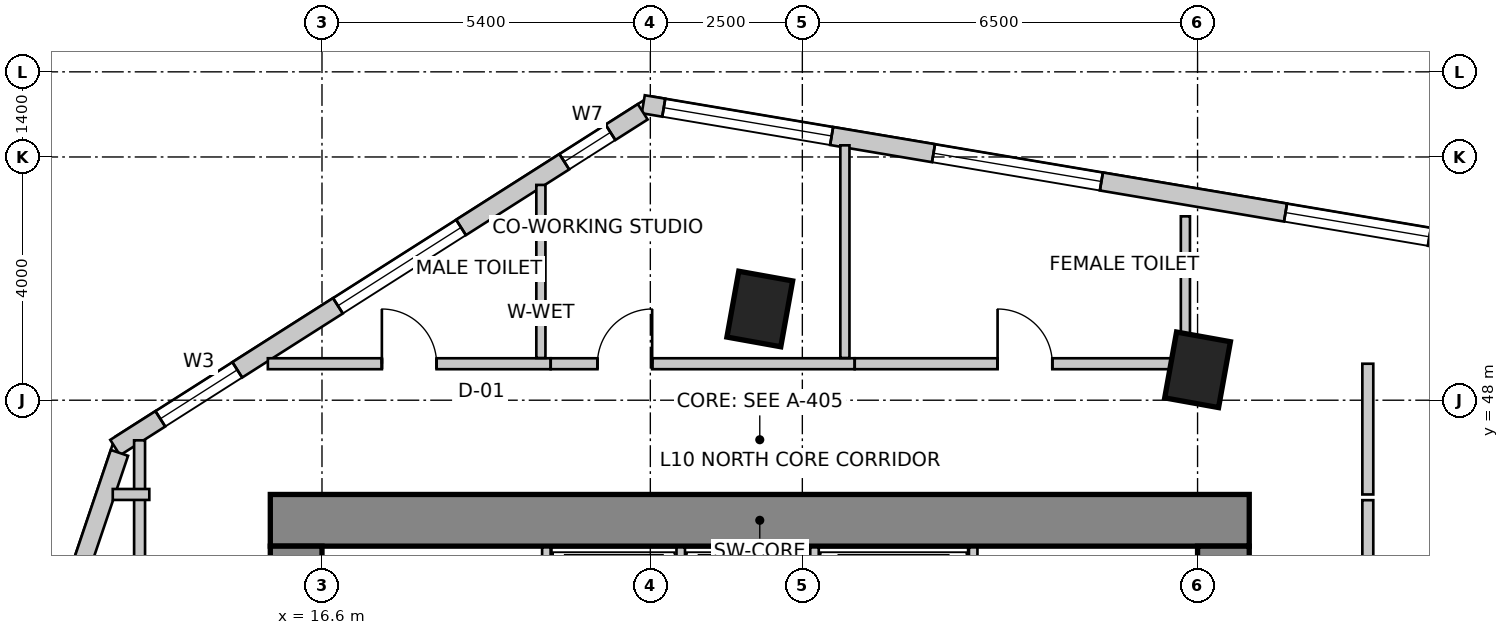
"""IFC4 building model, lengths in metres.
Left out: names, types, materials, properties, quantities, classifications, styles, units other than length and angle.
Written with IfcOpenShell. Run it as: python <this file> out.ifc"""

import sys

from ifc_helpers import new_model, si_unit, direction, frame, frame_2d, origin, origin_2d, place, context, subcontext, project, spatial, rectangle, extrude, source, transform, mapped, element, fill, save


model = new_model("IFC4")
c1 = context("Model", 3, precision=1e-05, world=origin(), true_north=direction((0.0, 1.0)))
c2 = subcontext(c1, "Body", "Model", "MODEL_VIEW")
j1 = project(units=[si_unit("LENGTHUNIT", "METRE"), si_unit("PLANEANGLEUNIT", "RADIAN")], contexts=[c1])
p1 = place(None, origin())
s1 = spatial("IfcSite", under=j1, at=p1, CompositionType="ELEMENT")
p2 = place(p1, origin())
s2 = spatial("IfcBuilding", under=s1, at=p2, CompositionType="ELEMENT")
p3 = place(p2, frame((0.0, 0.0, 43.0)))
s3 = spatial("IfcBuildingStorey", under=s2, at=p3, CompositionType="ELEMENT", Elevation=43.0)
p4 = place(p3, frame((15.75, 46.025, 0.0), z_axis=(0.0, 0.0, 1.0), x_axis=(1.0, 0.0, 0.0)))
e1 = element("IfcWall", 1, at=p4, inside=s3, PredefinedType="SHEAR", context=c2, shape_type="SweptSolid", body=[
    extrude(rectangle(XDim=16.1, YDim=0.85, at=frame_2d((8.05, 0.0))), origin(), (0.0, 0.0, 1.0), 4.0),
])
p5 = place(p3, frame((16.175, 34.2, 0.0), z_axis=(0.0, 0.0, 1.0), x_axis=(0.0, 1.0, 0.0)))
e2 = element("IfcWall", 2, at=p5, inside=s3, PredefinedType="SHEAR", context=c2, shape_type="SweptSolid", body=[
    extrude(rectangle(XDim=11.4, YDim=0.85, at=frame_2d((5.7, 0.0))), origin(), (0.0, 0.0, 1.0), 4.0),
])
m1 = source(origin(), c2, "Body", "SweptSolid", [
    extrude(rectangle(XDim=1.1, YDim=2.15, at=frame_2d((0.55, 1.075))), frame((0.0, 0.435, 0.0), z_axis=(0.0, -1.0, 0.0), x_axis=(1.0, 0.0, 0.0)), (0.0, 0.0, 1.0), 0.87),
])
p6 = place(p5, frame((7.15, 0.0, 0.0)))
e3 = element("IfcOpeningElement", 3, at=p6, cuts=e2, PredefinedType="OPENING", context=c2, shape_type="MappedRepresentation", body=[
    mapped(m1, transform((0.0, 0.0, 0.0), scale=1.0)),
])
p7 = place(p3, frame((31.425, 34.2, 0.0), z_axis=(0.0, 0.0, 1.0), x_axis=(0.0, 1.0, 0.0)))
e4 = element("IfcWall", 4, at=p7, inside=s3, PredefinedType="SHEAR", context=c2, shape_type="SweptSolid", body=[
    extrude(rectangle(XDim=11.4, YDim=0.85, at=frame_2d((5.7, 0.0))), origin(), (0.0, 0.0, 1.0), 4.0),
])
p8 = place(p7, frame((7.35, 0.0, 0.0)))
e5 = element("IfcOpeningElement", 5, at=p8, cuts=e4, PredefinedType="OPENING", context=c2, shape_type="MappedRepresentation", body=[
    mapped(m1, transform((0.0, 0.0, 0.0), scale=1.0)),
])
m2 = source(origin(), c2, "Body", "SweptSolid", [
    extrude(rectangle(XDim=0.9, YDim=1.1, at=origin_2d()), origin(), (0.0, 0.0, 1.0), 4.0),
])
for number, where, z_axis, x_axis in (
    (6, (23.8, 49.5, 0.0), (0.0, 0.0, 1.0), (0.984, -0.177, 0.0)),
    (7, (31.0, 48.5, 0.0), (0.0, 0.0, 1.0), (0.984, -0.177, 0.0)),
):
    element("IfcColumn", number, at=place(p3, frame(where, z_axis=z_axis, x_axis=x_axis)), inside=s3, PredefinedType="COLUMN", context=c2, shape_type="MappedRepresentation", body=[
        mapped(m2, transform((0.0, 0.0, 0.0), scale=1.0)),
    ])
p9 = place(p3, frame((58.761, 46.648, 0.0), z_axis=(0.0, 0.0, 1.0), x_axis=(-0.98607502735, 0.166301053624, 0.0)))
e8 = element("IfcWall", 8, at=p9, inside=s3, PredefinedType="SOLIDWALL", context=c2, shape_type="SweptSolid", body=[
    extrude(rectangle(XDim=37.397, YDim=0.3, at=frame_2d((18.699, 0.0))), origin(), (0.0, 0.0, 1.0), 3.75),
])
m3 = source(origin(), c2, "Body", "SweptSolid", [
    extrude(rectangle(XDim=2.4, YDim=2.2, at=frame_2d((1.2, 1.1))), frame((0.0, 0.16, 0.0), z_axis=(0.0, -1.0, 0.0), x_axis=(1.0, 0.0, 0.0)), (0.0, 0.0, 1.0), 0.32),
])
p10 = place(p9, frame((0.476, 0.0, 0.85)))
e9 = element("IfcOpeningElement", 9, at=p10, cuts=e8, PredefinedType="OPENING", context=c2, shape_type="MappedRepresentation", body=[
    mapped(m3, transform((0.0, 0.0, 0.0), scale=1.0)),
])
m4 = source(origin(), c2, "Body", "SweptSolid", [
    extrude(rectangle(XDim=2.8, YDim=2.4, at=frame_2d((1.4, 1.2))), frame((0.0, 0.16, 0.0), z_axis=(0.0, -1.0, 0.0), x_axis=(1.0, 0.0, 0.0)), (0.0, 0.0, 1.0), 0.32),
])
p11 = place(p9, frame((4.371, 0.0, 0.85)))
e10 = element("IfcOpeningElement", 10, at=p11, cuts=e8, PredefinedType="OPENING", context=c2, shape_type="MappedRepresentation", body=[
    mapped(m4, transform((0.0, 0.0, 0.0), scale=1.0)),
])
p12 = place(p9, frame((9.169, 0.0, 0.85)))
e11 = element("IfcOpeningElement", 11, at=p12, cuts=e8, PredefinedType="OPENING", context=c2, shape_type="MappedRepresentation", body=[
    mapped(m3, transform((0.0, 0.0, 0.0), scale=1.0)),
])
p13 = place(p9, frame((13.566, 0.0, 0.85)))
e12 = element("IfcOpeningElement", 12, at=p13, cuts=e8, PredefinedType="OPENING", context=c2, shape_type="MappedRepresentation", body=[
    mapped(m4, transform((0.0, 0.0, 0.0), scale=1.0)),
])
p14 = place(p9, frame((18.899, 0.0, 0.85)))
e13 = element("IfcOpeningElement", 13, at=p14, cuts=e8, PredefinedType="OPENING", context=c2, shape_type="MappedRepresentation", body=[
    mapped(m4, transform((0.0, 0.0, 0.0), scale=1.0)),
])
p15 = place(p9, frame((24.286, 0.0, 0.85)))
e14 = element("IfcOpeningElement", 14, at=p15, cuts=e8, PredefinedType="OPENING", context=c2, shape_type="MappedRepresentation", body=[
    mapped(m3, transform((0.0, 0.0, 0.0), scale=1.0)),
])
p16 = place(p9, frame((29.757, 0.0, 0.85)))
e15 = element("IfcOpeningElement", 15, at=p16, cuts=e8, PredefinedType="OPENING", context=c2, shape_type="MappedRepresentation", body=[
    mapped(m4, transform((0.0, 0.0, 0.0), scale=1.0)),
])
p17 = place(p9, frame((34.256, 0.0, 0.85)))
e16 = element("IfcOpeningElement", 16, at=p17, cuts=e8, PredefinedType="OPENING", context=c2, shape_type="MappedRepresentation", body=[
    mapped(m4, transform((0.0, 0.0, 0.0), scale=1.0)),
])
p18 = place(p3, frame((21.875, 52.743, 0.0), z_axis=(0.0, 0.0, 1.0), x_axis=(-0.843647802826, -0.536896996441, 0.0)))
e17 = element("IfcWall", 17, at=p18, inside=s3, PredefinedType="SOLIDWALL", context=c2, shape_type="SweptSolid", body=[
    extrude(rectangle(XDim=10.284, YDim=0.3, at=frame_2d((5.142, 0.0))), origin(), (0.0, 0.0, 1.0), 3.75),
])
m5 = source(origin(), c2, "Body", "SweptSolid", [
    extrude(rectangle(XDim=0.9, YDim=1.6, at=frame_2d((0.45, 0.8))), frame((0.0, 0.16, 0.0), z_axis=(0.0, -1.0, 0.0), x_axis=(1.0, 0.0, 0.0)), (0.0, 0.0, 1.0), 0.32),
])
p19 = place(p18, frame((0.629, 0.0, 0.85)))
e18 = element("IfcOpeningElement", 18, at=p19, cuts=e17, PredefinedType="OPENING", context=c2, shape_type="MappedRepresentation", body=[
    mapped(m5, transform((0.0, 0.0, 0.0), scale=1.0)),
])
p20 = place(p18, frame((3.542, 0.0, 0.85)))
e19 = element("IfcOpeningElement", 19, at=p20, cuts=e17, PredefinedType="OPENING", context=c2, shape_type="MappedRepresentation", body=[
    mapped(m3, transform((0.0, 0.0, 0.0), scale=1.0)),
])
m6 = source(origin(), c2, "Body", "SweptSolid", [
    extrude(rectangle(XDim=1.5, YDim=1.8, at=frame_2d((0.75, 0.9))), frame((0.0, 0.16, 0.0), z_axis=(0.0, -1.0, 0.0), x_axis=(1.0, 0.0, 0.0)), (0.0, 0.0, 1.0), 0.32),
])
p21 = place(p18, frame((7.904, 0.0, 0.85)))
e20 = element("IfcOpeningElement", 20, at=p21, cuts=e17, PredefinedType="OPENING", context=c2, shape_type="MappedRepresentation", body=[
    mapped(m6, transform((0.0, 0.0, 0.0), scale=1.0)),
])
p22 = place(p3, frame((13.269, 47.134, 0.0), z_axis=(0.0, 0.0, 1.0), x_axis=(-0.319920423265, -0.947444416722, 0.0)))
e21 = element("IfcWall", 21, at=p22, inside=s3, PredefinedType="SOLIDWALL", context=c2, shape_type="SweptSolid", body=[
    extrude(rectangle(XDim=16.135, YDim=0.3, at=frame_2d((8.067, 0.0))), origin(), (0.0, 0.0, 1.0), 3.75),
])
p23 = place(p22, frame((1.988, 0.0, 0.85)))
e22 = element("IfcOpeningElement", 22, at=p23, cuts=e21, PredefinedType="OPENING", context=c2, shape_type="MappedRepresentation", body=[
    mapped(m4, transform((0.0, 0.0, 0.0), scale=1.0)),
])
p24 = place(p22, frame((7.159, 0.0, 0.85)))
e23 = element("IfcOpeningElement", 23, at=p24, cuts=e21, PredefinedType="OPENING", context=c2, shape_type="MappedRepresentation", body=[
    mapped(m3, transform((0.0, 0.0, 0.0), scale=1.0)),
])
p25 = place(p22, frame((11.93, 0.0, 0.85)))
e24 = element("IfcOpeningElement", 24, at=p25, cuts=e21, PredefinedType="OPENING", context=c2, shape_type="MappedRepresentation", body=[
    mapped(m4, transform((0.0, 0.0, 0.0), scale=1.0)),
])
for number, where, z_axis, x_axis in (
    (25, (20.29, 43.28, 0.0), (0.0, 0.0, 1.0), (0.0, 1.0, 0.0)),
    (26, (27.31, 43.28, 0.0), (0.0, 0.0, 1.0), (0.0, 1.0, 0.0)),
):
    element("IfcWall", number, at=place(p3, frame(where, z_axis=z_axis, x_axis=x_axis)), inside=s3, PredefinedType="SOLIDWALL", context=c2, shape_type="SweptSolid", body=[
        extrude(rectangle(XDim=2.3, YDim=0.14, at=frame_2d((1.15, 0.0))), origin(), (0.0, 0.0, 1.0), 3.75),
    ])
for number, where, z_axis, x_axis in (
    (27, (22.5, 43.02, 0.0), (0.0, 0.0, 1.0), (0.0, 1.0, 0.0)),
    (28, (24.7, 43.02, 0.0), (0.0, 0.0, 1.0), (0.0, 1.0, 0.0)),
):
    element("IfcWall", number, at=place(p3, frame(where, z_axis=z_axis, x_axis=x_axis)), inside=s3, PredefinedType="SOLIDWALL", context=c2, shape_type="SweptSolid", body=[
        extrude(rectangle(XDim=2.56, YDim=0.14, at=frame_2d((1.28, 0.0))), origin(), (0.0, 0.0, 1.0), 3.75),
    ])
p26 = place(p3, frame((13.6, 33.444, 0.0), z_axis=(0.0, 0.0, 1.0), x_axis=(0.0, 1.0, 0.0)))
e29 = element("IfcWall", 29, at=p26, inside=s3, PredefinedType="PARTITIONING", context=c2, shape_type="SweptSolid", body=[
    extrude(rectangle(XDim=13.896, YDim=0.18, at=frame_2d((6.948, 0.0))), origin(), (0.0, 0.0, 1.0), 2.892),
])
m7 = source(origin(), c2, "Body", "SweptSolid", [
    extrude(rectangle(XDim=0.9, YDim=2.15, at=frame_2d((0.45, 1.075))), frame((0.0, 0.1, 0.0), z_axis=(0.0, -1.0, 0.0), x_axis=(1.0, 0.0, 0.0)), (0.0, 0.0, 1.0), 0.2),
])
p27 = place(p26, frame((4.144, 0.0, 0.0)))
e30 = element("IfcOpeningElement", 30, at=p27, cuts=e29, PredefinedType="OPENING", context=c2, shape_type="MappedRepresentation", body=[
    mapped(m7, transform((0.0, 0.0, 0.0), scale=1.0)),
])
p28 = place(p3, frame((13.76, 46.45, 0.0), z_axis=(0.0, 0.0, 1.0), x_axis=(-1.0, 0.0, 0.0)))
e31 = element("IfcWall", 31, at=p28, inside=s3, PredefinedType="PARTITIONING", context=c2, shape_type="SweptSolid", body=[
    extrude(rectangle(XDim=0.601, YDim=0.18, at=frame_2d((0.301, 0.0))), origin(), (0.0, 0.0, 1.0), 3.75),
])
p29 = place(p3, frame((15.71, 48.6, 0.0), z_axis=(0.0, 0.0, 1.0), x_axis=(1.0, 0.0, 0.0)))
e32 = element("IfcWall", 32, at=p29, inside=s3, PredefinedType="PARTITIONING", context=c2, shape_type="SweptSolid", body=[
    extrude(rectangle(XDim=4.65, YDim=0.18, at=frame_2d((2.325, 0.0))), origin(), (0.0, 0.0, 1.0), 3.75),
])
p30 = place(p29, frame((1.875, 0.0, 0.0)))
e33 = element("IfcOpeningElement", 33, at=p30, cuts=e32, PredefinedType="OPENING", context=c2, shape_type="MappedRepresentation", body=[
    mapped(m7, transform((0.0, 0.0, 0.0), scale=1.0)),
])
p31 = place(p3, frame((20.362, 48.6, 0.0), z_axis=(0.0, 0.0, 1.0), x_axis=(1.0, 0.0, 0.0)))
e34 = element("IfcWall", 34, at=p31, inside=s3, PredefinedType="PARTITIONING", context=c2, shape_type="SweptSolid", body=[
    extrude(rectangle(XDim=4.998, YDim=0.18, at=frame_2d((2.499, 0.0))), origin(), (0.0, 0.0, 1.0), 3.419),
])
p32 = place(p31, frame((0.768, 0.0, 0.0)))
e35 = element("IfcOpeningElement", 35, at=p32, cuts=e34, PredefinedType="OPENING", context=c2, shape_type="MappedRepresentation", body=[
    mapped(m7, transform((0.0, 0.0, 0.0), scale=1.0)),
])
p33 = place(p3, frame((25.362, 48.6, 0.0), z_axis=(0.0, 0.0, 1.0), x_axis=(1.0, 0.0, 0.0)))
e36 = element("IfcWall", 36, at=p33, inside=s3, PredefinedType="PARTITIONING", context=c2, shape_type="SweptSolid", body=[
    extrude(rectangle(XDim=5.598, YDim=0.18, at=frame_2d((2.799, 0.0))), origin(), (0.0, 0.0, 1.0), 2.892),
])
p34 = place(p33, frame((2.349, 0.0, 0.0)))
e37 = element("IfcOpeningElement", 37, at=p34, cuts=e36, PredefinedType="OPENING", context=c2, shape_type="MappedRepresentation", body=[
    mapped(m7, transform((0.0, 0.0, 0.0), scale=1.0)),
])
p35 = place(p3, frame((33.8, 48.6, 0.0), z_axis=(0.0, 0.0, 1.0), x_axis=(0.0, -1.0, 0.0)))
e38 = element("IfcWall", 38, at=p35, inside=s3, PredefinedType="PARTITIONING", context=c2, shape_type="SweptSolid", body=[
    extrude(rectangle(XDim=2.15, YDim=0.18, at=frame_2d((1.075, 0.0))), origin(), (0.0, 0.0, 1.0), 2.892),
])
p36 = place(p3, frame((33.8, 46.356, 0.0), z_axis=(0.0, 0.0, 1.0), x_axis=(0.0, -1.0, 0.0)))
e39 = element("IfcWall", 39, at=p36, inside=s3, PredefinedType="PARTITIONING", context=c2, shape_type="SweptSolid", body=[
    extrude(rectangle(XDim=3.716, YDim=0.18, at=frame_2d((1.858, 0.0))), origin(), (0.0, 0.0, 1.0), 3.279),
])
p37 = place(p3, frame((20.2, 51.54, 0.0), z_axis=(0.0, 0.0, 1.0), x_axis=(0.0, -1.0, 0.0)))
e40 = element("IfcWall", 40, at=p37, inside=s3, PredefinedType="PARTITIONING", context=c2, shape_type="SweptSolid", body=[
    extrude(rectangle(XDim=2.846, YDim=0.15, at=frame_2d((1.423, 0.0))), origin(), (0.0, 0.0, 1.0), 3.75),
])
p38 = place(p3, frame((25.2, 52.192, 0.0), z_axis=(0.0, 0.0, 1.0), x_axis=(0.0, -1.0, 0.0)))
e41 = element("IfcWall", 41, at=p38, inside=s3, PredefinedType="PARTITIONING", context=c2, shape_type="SweptSolid", body=[
    extrude(rectangle(XDim=3.498, YDim=0.15, at=frame_2d((1.749, 0.0))), origin(), (0.0, 0.0, 1.0), 2.892),
])
p39 = place(p3, frame((30.8, 51.024, 0.0), z_axis=(0.0, 0.0, 1.0), x_axis=(0.0, -1.0, 0.0)))
e42 = element("IfcWall", 42, at=p39, inside=s3, PredefinedType="PARTITIONING", context=c2, shape_type="SweptSolid", body=[
    extrude(rectangle(XDim=2.204, YDim=0.15, at=frame_2d((1.102, 0.0))), origin(), (0.0, 0.0, 1.0), 3.75),
])
m8 = source(origin(), c2, "Body", "SweptSolid", [
    extrude(rectangle(XDim=2.4, YDim=2.2, at=frame_2d((1.2, 1.1))), frame((0.0, -0.015, 0.0), z_axis=(0.0, -1.0, 0.0), x_axis=(1.0, 0.0, 0.0)), (0.0, 0.0, 1.0), 0.06),
])
p40 = place(p15, origin())
e43 = element("IfcWindow", 43, at=p40, inside=s3, PartitioningType="SINGLE_PANEL", PredefinedType="WINDOW", context=c2, shape_type="MappedRepresentation", body=[
    mapped(m8, transform((0.0, 0.0, 0.0), scale=1.0)),
])
fill(e14, e43)
m9 = source(origin(), c2, "Body", "SweptSolid", [
    extrude(rectangle(XDim=2.8, YDim=2.4, at=frame_2d((1.4, 1.2))), frame((0.0, -0.015, 0.0), z_axis=(0.0, -1.0, 0.0), x_axis=(1.0, 0.0, 0.0)), (0.0, 0.0, 1.0), 0.06),
])
p41 = place(p16, origin())
e44 = element("IfcWindow", 44, at=p41, inside=s3, PartitioningType="SINGLE_PANEL", PredefinedType="WINDOW", context=c2, shape_type="MappedRepresentation", body=[
    mapped(m9, transform((0.0, 0.0, 0.0), scale=1.0)),
])
fill(e15, e44)
p42 = place(p17, origin())
e45 = element("IfcWindow", 45, at=p42, inside=s3, PartitioningType="SINGLE_PANEL", PredefinedType="WINDOW", context=c2, shape_type="MappedRepresentation", body=[
    mapped(m9, transform((0.0, 0.0, 0.0), scale=1.0)),
])
fill(e16, e45)
m10 = source(origin(), c2, "Body", "SweptSolid", [
    extrude(rectangle(XDim=0.9, YDim=1.6, at=frame_2d((0.45, 0.8))), frame((0.0, -0.015, 0.0), z_axis=(0.0, -1.0, 0.0), x_axis=(1.0, 0.0, 0.0)), (0.0, 0.0, 1.0), 0.06),
])
p43 = place(p19, origin())
e46 = element("IfcWindow", 46, at=p43, inside=s3, PartitioningType="SINGLE_PANEL", PredefinedType="WINDOW", context=c2, shape_type="MappedRepresentation", body=[
    mapped(m10, transform((0.0, 0.0, 0.0), scale=1.0)),
])
fill(e18, e46)
p44 = place(p20, origin())
e47 = element("IfcWindow", 47, at=p44, inside=s3, PartitioningType="SINGLE_PANEL", PredefinedType="WINDOW", context=c2, shape_type="MappedRepresentation", body=[
    mapped(m8, transform((0.0, 0.0, 0.0), scale=1.0)),
])
fill(e19, e47)
m11 = source(origin(), c2, "Body", "SweptSolid", [
    extrude(rectangle(XDim=1.5, YDim=1.8, at=frame_2d((0.75, 0.9))), frame((0.0, -0.015, 0.0), z_axis=(0.0, -1.0, 0.0), x_axis=(1.0, 0.0, 0.0)), (0.0, 0.0, 1.0), 0.06),
])
p45 = place(p21, origin())
e48 = element("IfcWindow", 48, at=p45, inside=s3, PartitioningType="SINGLE_PANEL", PredefinedType="WINDOW", context=c2, shape_type="MappedRepresentation", body=[
    mapped(m11, transform((0.0, 0.0, 0.0), scale=1.0)),
])
fill(e20, e48)
m12 = source(origin(), c2, "Body", "SweptSolid", [
    extrude(rectangle(XDim=0.9, YDim=2.15, at=frame_2d((0.45, 1.075))), frame((0.0, 0.025, 0.0), z_axis=(0.0, -1.0, 0.0), x_axis=(1.0, 0.0, 0.0)), (0.0, 0.0, 1.0), 0.05),
])
p46 = place(p30, origin())
e49 = element("IfcDoor", 49, at=p46, inside=s3, OperationType="SINGLE_SWING_LEFT", PredefinedType="DOOR", context=c2, shape_type="MappedRepresentation", body=[
    mapped(m12, transform((0.0, 0.0, 0.0), scale=1.0)),
])
fill(e33, e49)
p47 = place(p32, origin())
e50 = element("IfcDoor", 50, at=p47, inside=s3, OperationType="SINGLE_SWING_RIGHT", PredefinedType="DOOR", context=c2, shape_type="MappedRepresentation", body=[
    mapped(m12, transform((0.0, 0.0, 0.0), scale=1.0)),
])
fill(e35, e50)
p48 = place(p34, origin())
e51 = element("IfcDoor", 51, at=p48, inside=s3, OperationType="SINGLE_SWING_LEFT", PredefinedType="DOOR", context=c2, shape_type="MappedRepresentation", body=[
    mapped(m12, transform((0.0, 0.0, 0.0), scale=1.0)),
])
fill(e37, e51)
save(model, sys.argv[1])
